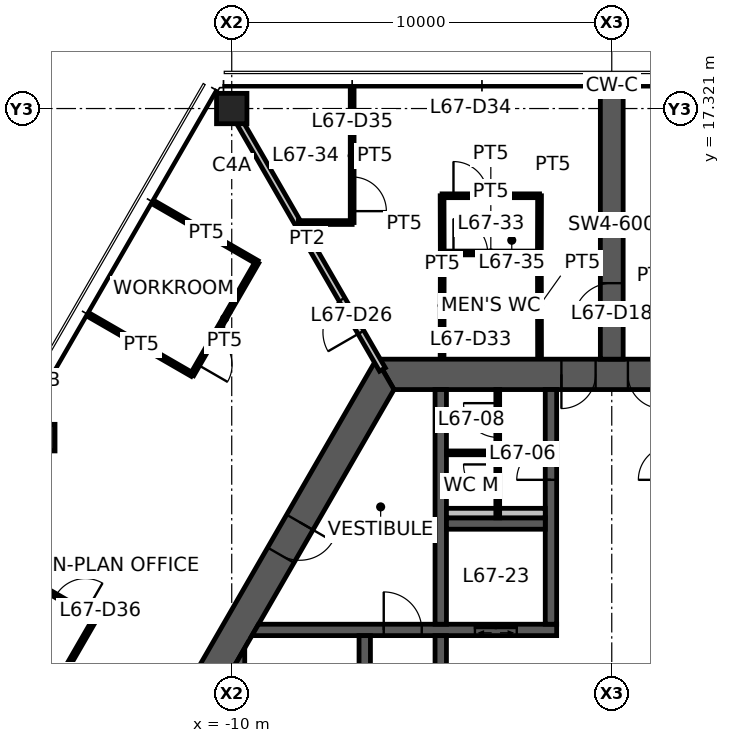
"""IFC4 building model, lengths in metres.
Left out: names, types, materials, properties, quantities, classifications, styles, units other than length and angle.
Written with IfcOpenShell. Run it as: python <this file> out.ifc"""

import sys

from ifc_helpers import new_model, si_unit, direction, frame, frame_2d, origin, origin_2d, place, context, subcontext, project, spatial, polyline, rectangle, hollow_rectangle, outline, extrude, element, fill, save


model = new_model("IFC4")
c1 = context("Model", 3, precision=1e-05, world=origin(), true_north=direction((0.0, 1.0)))
c2 = subcontext(c1, "Body", "Model", "MODEL_VIEW")
j1 = project(units=[si_unit("LENGTHUNIT", "METRE"), si_unit("PLANEANGLEUNIT", "RADIAN")], contexts=[c1])
p1 = place(None, origin())
s1 = spatial("IfcSite", under=j1, at=p1, CompositionType="ELEMENT")
p2 = place(p1, origin())
s2 = spatial("IfcBuilding", under=s1, at=p2, CompositionType="ELEMENT")
p3 = place(p2, frame((0.0, 0.0, 267.4)))
s3 = spatial("IfcBuildingStorey", under=s2, at=p3, CompositionType="ELEMENT", Elevation=267.4)
p4 = place(p3, frame((-10.0, 17.321, 0.0), z_axis=(0.0, 0.0, 1.0), x_axis=(1.0, 0.0, 0.0)))
e1 = element("IfcColumn", 1, at=p4, inside=s3, PredefinedType="COLUMN", context=c2, shape_type="SweptSolid", body=[
    extrude(hollow_rectangle(XDim=0.8, YDim=0.8, WallThickness=0.04, at=origin_2d()), origin(), (0.0, 0.0, 1.0), 3.9),
])
p5 = place(p3, frame((-15.0, 8.66, 0.0), z_axis=(0.0, 0.0, 1.0), x_axis=(1.0, 0.0, 0.0)))
e2 = element("IfcColumn", 2, at=p5, inside=s3, PredefinedType="COLUMN", context=c2, shape_type="SweptSolid", body=[
    extrude(hollow_rectangle(XDim=0.7, YDim=0.7, WallThickness=0.032, at=origin_2d()), origin(), (0.0, 0.0, 1.0), 3.9),
])
p6 = place(p3, frame((5.961, 10.325, 0.0), z_axis=(0.0, 0.0, 1.0), x_axis=(-1.0, 0.0, 0.0)))
e3 = element("IfcWall", 3, at=p6, inside=s3, PredefinedType="SHEAR", context=c2, shape_type="SweptSolid", body=[
    extrude(outline(polyline([(-0.231, -0.4), (4.636, -0.4), (5.536, -0.4), (6.386, -0.4), (7.286, -0.4), (12.153, -0.4), (11.691, 0.4), (7.286, 0.4), (6.386, 0.4), (5.536, 0.4), (4.636, 0.4), (0.231, 0.4), (-0.231, -0.4)])), origin(), (0.0, 0.0, 1.0), 3.9),
])
p7 = place(p6, frame((6.386, 0.0, 0.0)))
e4 = element("IfcOpeningElement", 4, at=p7, cuts=e3, PredefinedType="OPENING", context=c2, shape_type="SweptSolid", body=[
    extrude(rectangle(XDim=0.9, YDim=2.1, at=frame_2d((0.45, 1.05))), frame((0.0, 0.41, 0.0), z_axis=(0.0, -1.0, 0.0), x_axis=(1.0, 0.0, 0.0)), (0.0, 0.0, 1.0), 0.82),
])
p8 = place(p6, frame((4.636, 0.0, 0.0)))
e5 = element("IfcOpeningElement", 5, at=p8, cuts=e3, PredefinedType="OPENING", context=c2, shape_type="SweptSolid", body=[
    extrude(rectangle(XDim=0.9, YDim=2.1, at=frame_2d((0.45, 1.05))), frame((0.0, 0.41, 0.0), z_axis=(0.0, -1.0, 0.0), x_axis=(1.0, 0.0, 0.0)), (0.0, 0.0, 1.0), 0.82),
])
p9 = place(p3, frame((-5.961, 10.325, 0.0), z_axis=(0.0, 0.0, 1.0), x_axis=(-0.500004296715, -0.866022923061, 0.0)))
e6 = element("IfcWall", 6, at=p9, inside=s3, PredefinedType="SHEAR", context=c2, shape_type="SweptSolid", body=[
    extrude(outline(polyline([(-0.231, -0.4), (4.494, -0.4), (5.494, -0.4), (12.153, -0.4), (11.691, 0.4), (5.494, 0.4), (4.494, 0.4), (0.231, 0.4), (-0.231, -0.4)])), origin(), (0.0, 0.0, 1.0), 3.9),
])
p10 = place(p9, frame((4.494, 0.0, 0.0)))
e7 = element("IfcOpeningElement", 7, at=p10, cuts=e6, PredefinedType="OPENING", context=c2, shape_type="SweptSolid", body=[
    extrude(rectangle(XDim=1.0, YDim=2.1, at=frame_2d((0.5, 1.05))), frame((0.0, 0.41, 0.0), z_axis=(0.0, -1.0, 0.0), x_axis=(1.0, 0.0, 0.0)), (0.0, 0.0, 1.0), 0.82),
])
p11 = place(p3, frame((0.0, 10.725, 0.0), z_axis=(0.0, 0.0, 1.0), x_axis=(0.0, 1.0, 0.0)))
e8 = element("IfcWall", 8, at=p11, inside=s3, PredefinedType="SHEAR", context=c2, shape_type="SweptSolid", body=[
    extrude(rectangle(XDim=7.045, YDim=0.6, at=frame_2d((3.523, 0.0))), origin(), (0.0, 0.0, 1.0), 3.9),
])
p12 = place(p11, frame((1.0, 0.0, 0.0)))
e9 = element("IfcOpeningElement", 9, at=p12, cuts=e8, PredefinedType="OPENING", context=c2, shape_type="SweptSolid", body=[
    extrude(rectangle(XDim=1.0, YDim=2.1, at=frame_2d((0.5, 1.05))), frame((0.0, 0.31, 0.0), z_axis=(0.0, -1.0, 0.0), x_axis=(1.0, 0.0, 0.0)), (0.0, 0.0, 1.0), 0.62),
])
p13 = place(p3, frame((-9.382, 3.6, 0.0), z_axis=(0.0, 0.0, 1.0), x_axis=(1.0, 0.0, 0.0)))
e10 = element("IfcWall", 10, at=p13, inside=s3, PredefinedType="SHEAR", context=c2, shape_type="SweptSolid", body=[
    extrude(outline(polyline([(-0.087, -0.15), (3.382, -0.15), (4.382, -0.15), (5.782, -0.15), (6.882, -0.15), (7.932, -0.15), (7.932, 0.15), (6.882, 0.15), (5.782, 0.15), (4.382, 0.15), (3.382, 0.15), (0.087, 0.15), (-0.087, -0.15)])), origin(), (0.0, 0.0, 1.0), 3.9),
])
p14 = place(p13, frame((3.382, 0.0, 0.0)))
e11 = element("IfcOpeningElement", 11, at=p14, cuts=e10, PredefinedType="OPENING", context=c2, shape_type="SweptSolid", body=[
    extrude(rectangle(XDim=1.0, YDim=2.1, at=frame_2d((0.5, 1.05))), frame((0.0, 0.16, 0.0), z_axis=(0.0, -1.0, 0.0), x_axis=(1.0, 0.0, 0.0)), (0.0, 0.0, 1.0), 0.32),
])
p15 = place(p13, frame((5.782, 0.0, 0.0)))
e12 = element("IfcOpeningElement", 12, at=p15, cuts=e10, PredefinedType="OPENING", context=c2, shape_type="SweptSolid", body=[
    extrude(rectangle(XDim=1.1, YDim=2.1, at=frame_2d((0.55, 1.05))), frame((0.0, 0.16, 0.0), z_axis=(0.0, -1.0, 0.0), x_axis=(1.0, 0.0, 0.0)), (0.0, 0.0, 1.0), 0.32),
])
p16 = place(p3, frame((-1.6, 3.75, 0.0), z_axis=(0.0, 0.0, 1.0), x_axis=(0.0, 1.0, 0.0)))
e13 = element("IfcWall", 13, at=p16, inside=s3, PredefinedType="SHEAR", context=c2, shape_type="SweptSolid", body=[
    extrude(rectangle(XDim=6.175, YDim=0.3, at=frame_2d((3.087, 0.0))), origin(), (0.0, 0.0, 1.0), 3.9),
])
p17 = place(p16, frame((3.8, 0.0, 0.0)))
e14 = element("IfcOpeningElement", 14, at=p17, cuts=e13, PredefinedType="OPENING", context=c2, shape_type="SweptSolid", body=[
    extrude(rectangle(XDim=0.9, YDim=2.1, at=frame_2d((0.45, 1.05))), frame((0.0, 0.16, 0.0), z_axis=(0.0, -1.0, 0.0), x_axis=(1.0, 0.0, 0.0)), (0.0, 0.0, 1.0), 0.32),
])
p18 = place(p3, frame((-4.5, -3.45, 0.0), z_axis=(0.0, 0.0, 1.0), x_axis=(0.0, 1.0, 0.0)))
e15 = element("IfcWall", 15, at=p18, inside=s3, PredefinedType="SHEAR", context=c2, shape_type="SweptSolid", body=[
    extrude(rectangle(XDim=6.9, YDim=0.3, at=frame_2d((3.45, 0.0))), origin(), (0.0, 0.0, 1.0), 3.9),
])
p19 = place(p18, frame((2.95, 0.0, 0.0)))
e16 = element("IfcOpeningElement", 16, at=p19, cuts=e15, PredefinedType="OPENING", context=c2, shape_type="SweptSolid", body=[
    extrude(rectangle(XDim=1.0, YDim=2.1, at=frame_2d((0.5, 1.05))), frame((0.0, 0.16, 0.0), z_axis=(0.0, -1.0, 0.0), x_axis=(1.0, 0.0, 0.0)), (0.0, 0.0, 1.0), 0.32),
])
p20 = place(p3, frame((-6.5, -3.45, 0.0), z_axis=(0.0, 0.0, 1.0), x_axis=(0.0, 1.0, 0.0)))
e17 = element("IfcWall", 17, at=p20, inside=s3, PredefinedType="SHEAR", context=c2, shape_type="SweptSolid", body=[
    extrude(rectangle(XDim=6.9, YDim=0.3, at=frame_2d((3.45, 0.0))), origin(), (0.0, 0.0, 1.0), 3.9),
])
p21 = place(p20, frame((0.1, 0.0, 0.0)))
e18 = element("IfcOpeningElement", 18, at=p21, cuts=e17, PredefinedType="OPENING", context=c2, shape_type="SweptSolid", body=[
    extrude(rectangle(XDim=1.0, YDim=2.1, at=frame_2d((0.5, 1.05))), frame((0.0, 0.16, 0.0), z_axis=(0.0, -1.0, 0.0), x_axis=(1.0, 0.0, 0.0)), (0.0, 0.0, 1.0), 0.32),
])
p22 = place(p3, frame((-4.5, 3.75, 0.0), z_axis=(0.0, 0.0, 1.0), x_axis=(0.0, 1.0, 0.0)))
e19 = element("IfcWall", 19, at=p22, inside=s3, PredefinedType="SHEAR", context=c2, shape_type="SweptSolid", body=[
    extrude(rectangle(XDim=6.175, YDim=0.3, at=frame_2d((3.087, 0.0))), origin(), (0.0, 0.0, 1.0), 3.9),
])
p23 = place(p3, frame((-4.35, 6.4, 0.0), z_axis=(0.0, 0.0, 1.0), x_axis=(1.0, 0.0, 0.0)))
e20 = element("IfcWall", 20, at=p23, inside=s3, PredefinedType="SHEAR", context=c2, shape_type="SweptSolid", body=[
    extrude(rectangle(XDim=2.6, YDim=0.3, at=frame_2d((1.3, 0.0))), origin(), (0.0, 0.0, 1.0), 3.9),
])
p24 = place(p3, frame((-9.808, -2.862, 0.0), z_axis=(0.0, 0.0, 1.0), x_axis=(0.0, 1.0, 0.0)))
e21 = element("IfcWall", 21, at=p24, inside=s3, PredefinedType="SHEAR", context=c2, shape_type="SweptSolid", body=[
    extrude(outline(polyline([(-0.26, -0.15), (5.984, -0.15), (5.465, 0.15), (0.26, 0.15), (-0.26, -0.15)])), origin(), (0.0, 0.0, 1.0), 3.9),
])
p25 = place(p3, frame((-4.35, 6.675, 0.0), z_axis=(0.0, 0.0, 1.0), x_axis=(1.0, 0.0, 0.0)))
e22 = element("IfcWall", 22, at=p25, inside=s3, PredefinedType="PLUMBINGWALL", context=c2, shape_type="SweptSolid", body=[
    extrude(rectangle(XDim=2.6, YDim=0.25, at=frame_2d((1.3, 0.0))), origin(), (0.0, 0.0, 1.0), 3.9),
])
p26 = place(p3, frame((-3.0, 6.55, 0.0), z_axis=(0.0, 0.0, 1.0), x_axis=(0.0, 1.0, 0.0)))
e23 = element("IfcWall", 23, at=p26, inside=s3, PredefinedType="PARTITIONING", context=c2, shape_type="SweptSolid", body=[
    extrude(rectangle(XDim=3.375, YDim=0.1, at=frame_2d((1.688, 0.0))), origin(), (0.0, 0.0, 1.0), 2.95),
])
p27 = place(p26, frame((0.505, 0.0, 0.0)))
e24 = element("IfcOpeningElement", 24, at=p27, cuts=e23, PredefinedType="OPENING", context=c2, shape_type="SweptSolid", body=[
    extrude(rectangle(XDim=0.9, YDim=2.1, at=frame_2d((0.45, 1.05))), frame((0.0, 0.06, 0.0), z_axis=(0.0, -1.0, 0.0), x_axis=(1.0, 0.0, 0.0)), (0.0, 0.0, 1.0), 0.12),
])
p28 = place(p26, frame((2.117, 0.0, 0.0)))
e25 = element("IfcOpeningElement", 25, at=p28, cuts=e23, PredefinedType="OPENING", context=c2, shape_type="SweptSolid", body=[
    extrude(rectangle(XDim=0.9, YDim=2.1, at=frame_2d((0.45, 1.05))), frame((0.0, 0.06, 0.0), z_axis=(0.0, -1.0, 0.0), x_axis=(1.0, 0.0, 0.0)), (0.0, 0.0, 1.0), 0.12),
])
p29 = place(p3, frame((-3.05, 8.26, 0.0), z_axis=(0.0, 0.0, 1.0), x_axis=(-1.0, 0.0, 0.0)))
e26 = element("IfcWall", 26, at=p29, inside=s3, PredefinedType="PARTITIONING", context=c2, shape_type="SweptSolid", body=[
    extrude(rectangle(XDim=1.3, YDim=0.1, at=frame_2d((0.65, 0.0))), origin(), (0.0, 0.0, 1.0), 2.95),
])
p30 = place(p3, frame((-6.035, 10.453, 0.0), z_axis=(0.0, 0.0, 1.0), x_axis=(-0.499989830942, 0.866031274813, 0.0)))
e27 = element("IfcWall", 27, at=p30, inside=s3, PredefinedType="PARTITIONING", context=c2, shape_type="SweptSolid", body=[
    extrude(rectangle(XDim=7.93, YDim=0.175, at=frame_2d((3.965, 0.0))), origin(), (0.0, 0.0, 1.0), 3.05),
])
p31 = place(p30, frame((1.13, 0.0, 0.0)))
e28 = element("IfcOpeningElement", 28, at=p31, cuts=e27, PredefinedType="OPENING", context=c2, shape_type="SweptSolid", body=[
    extrude(rectangle(XDim=1.0, YDim=2.1, at=frame_2d((0.5, 1.05))), frame((0.0, 0.098, 0.0), z_axis=(0.0, -1.0, 0.0), x_axis=(1.0, 0.0, 0.0)), (0.0, 0.0, 1.0), 0.195),
])
p32 = place(p3, frame((-4.465, 13.52, 0.0), z_axis=(0.0, 0.0, 1.0), x_axis=(1.0, 0.0, 0.0)))
e29 = element("IfcWall", 29, at=p32, inside=s3, PredefinedType="PARTITIONING", context=c2, shape_type="SweptSolid", body=[
    extrude(rectangle(XDim=2.565, YDim=0.1, at=frame_2d((1.283, 0.0))), origin(), (0.0, 0.0, 1.0), 2.95),
])
p33 = place(p32, frame((0.3, 0.0, 0.0)))
e30 = element("IfcOpeningElement", 30, at=p33, cuts=e29, PredefinedType="OPENING", context=c2, shape_type="SweptSolid", body=[
    extrude(rectangle(XDim=0.9, YDim=2.1, at=frame_2d((0.45, 1.05))), frame((0.0, 0.06, 0.0), z_axis=(0.0, -1.0, 0.0), x_axis=(1.0, 0.0, 0.0)), (0.0, 0.0, 1.0), 0.12),
])
for number, where, z_axis, x_axis in (
    (31, (-4.465, 10.745, 0.0), (0.0, 0.0, 1.0), (0.002, 1.0, 0.0)),
    (32, (-1.905, 13.525, 0.0), (0.0, 0.0, 1.0), (0.002, -1.0, 0.0)),
):
    element("IfcWall", number, at=place(p3, frame(where, z_axis=z_axis, x_axis=x_axis)), inside=s3, PredefinedType="PARTITIONING", context=c2, shape_type="SweptSolid", body=[
        extrude(rectangle(XDim=2.78, YDim=0.1, at=frame_2d((1.39, 0.0))), origin(), (0.0, 0.0, 1.0), 2.95),
    ])
p34 = place(p3, frame((-4.465, 15.025, 0.0), z_axis=(0.0, 0.0, 1.0), x_axis=(1.0, 0.0, 0.0)))
e33 = element("IfcWall", 33, at=p34, inside=s3, PredefinedType="PARTITIONING", context=c2, shape_type="SweptSolid", body=[
    extrude(rectangle(XDim=2.565, YDim=0.1, at=frame_2d((1.283, 0.0))), origin(), (0.0, 0.0, 1.0), 2.95),
])
p35 = place(p34, frame((0.3, 0.0, 0.0)))
e34 = element("IfcOpeningElement", 34, at=p35, cuts=e33, PredefinedType="OPENING", context=c2, shape_type="SweptSolid", body=[
    extrude(rectangle(XDim=0.9, YDim=2.1, at=frame_2d((0.45, 1.05))), frame((0.0, 0.06, 0.0), z_axis=(0.0, -1.0, 0.0), x_axis=(1.0, 0.0, 0.0)), (0.0, 0.0, 1.0), 0.12),
])
for number, where, z_axis, x_axis in (
    (35, (-4.46, 13.525, 0.0), (0.0, 0.0, 1.0), (-0.003, 1.0, 0.0)),
    (36, (-1.9, 15.025, 0.0), (0.0, 0.0, 1.0), (-0.003, -1.0, 0.0)),
):
    element("IfcWall", number, at=place(p3, frame(where, z_axis=z_axis, x_axis=x_axis)), inside=s3, PredefinedType="PARTITIONING", context=c2, shape_type="SweptSolid", body=[
        extrude(rectangle(XDim=1.5, YDim=0.1, at=frame_2d((0.75, 0.0))), origin(), (0.0, 0.0, 1.0), 2.95),
    ])
p36 = place(p3, frame((-6.831, 14.321, 0.0), z_axis=(0.0, 0.0, 1.0), x_axis=(-1.0, 0.0, 0.0)))
e37 = element("IfcWall", 37, at=p36, inside=s3, PredefinedType="PARTITIONING", context=c2, shape_type="SweptSolid", body=[
    extrude(rectangle(XDim=1.414, YDim=0.1, at=frame_2d((0.707, 0.0))), origin(), (0.0, 0.0, 1.0), 2.95),
])
p37 = place(p3, frame((-6.831, 17.835, 0.0), z_axis=(0.0, 0.0, 1.0), x_axis=(0.0, -1.0, 0.0)))
e38 = element("IfcWall", 38, at=p37, inside=s3, PredefinedType="PARTITIONING", context=c2, shape_type="SweptSolid", body=[
    extrude(rectangle(XDim=3.515, YDim=0.1, at=frame_2d((1.757, 0.0))), origin(), (0.0, 0.0, 1.0), 2.95),
])
p38 = place(p37, frame((2.315, 0.0, 0.0)))
e39 = element("IfcOpeningElement", 39, at=p38, cuts=e38, PredefinedType="OPENING", context=c2, shape_type="SweptSolid", body=[
    extrude(rectangle(XDim=0.9, YDim=2.1, at=frame_2d((0.45, 1.05))), frame((0.0, 0.06, 0.0), z_axis=(0.0, -1.0, 0.0), x_axis=(1.0, 0.0, 0.0)), (0.0, 0.0, 1.0), 0.12),
])
p39 = place(p3, frame((-17.154, 5.96, 0.0), z_axis=(0.0, 0.0, 1.0), x_axis=(0.866014662111, -0.500018604663, 0.0)))
e40 = element("IfcWall", 40, at=p39, inside=s3, PredefinedType="PARTITIONING", context=c2, shape_type="SweptSolid", body=[
    extrude(rectangle(XDim=4.115, YDim=0.1, at=frame_2d((2.058, 0.0))), origin(), (0.0, 0.0, 1.0), 2.95),
])
p40 = place(p39, frame((2.915, 0.0, 0.0)))
e41 = element("IfcOpeningElement", 41, at=p40, cuts=e40, PredefinedType="OPENING", context=c2, shape_type="SweptSolid", body=[
    extrude(rectangle(XDim=0.9, YDim=2.1, at=frame_2d((0.45, 1.05))), frame((0.0, 0.06, 0.0), z_axis=(0.0, -1.0, 0.0), x_axis=(1.0, 0.0, 0.0)), (0.0, 0.0, 1.0), 0.12),
])
p41 = place(p3, frame((-13.59, 3.902, 0.0), z_axis=(0.0, 0.0, 1.0), x_axis=(-0.500021524473, -0.866012976267, 0.0)))
e42 = element("IfcWall", 42, at=p41, inside=s3, PredefinedType="PARTITIONING", context=c2, shape_type="SweptSolid", body=[
    extrude(rectangle(XDim=3.415, YDim=0.1, at=frame_2d((1.708, 0.0))), origin(), (0.0, 0.0, 1.0), 2.95),
])
p42 = place(p3, frame((-12.0, 14.816, 0.0), z_axis=(0.0, 0.0, 1.0), x_axis=(0.866010015463, -0.500026652407, 0.0)))
e43 = element("IfcWall", 43, at=p42, inside=s3, PredefinedType="PARTITIONING", context=c2, shape_type="SweptSolid", body=[
    extrude(rectangle(XDim=3.08, YDim=0.1, at=frame_2d((1.54, 0.0))), origin(), (0.0, 0.0, 1.0), 2.95),
])
p43 = place(p3, frame((-11.041, 10.318, 0.0), z_axis=(0.0, 0.0, 1.0), x_axis=(-0.866056658381, 0.499945861543, 0.0)))
e44 = element("IfcWall", 44, at=p43, inside=s3, PredefinedType="PARTITIONING", context=c2, shape_type="SweptSolid", body=[
    extrude(rectangle(XDim=3.09, YDim=0.1, at=frame_2d((1.545, 0.0))), origin(), (0.0, 0.0, 1.0), 2.95),
])
p44 = place(p3, frame((-9.333, 13.276, 0.0), z_axis=(0.0, 0.0, 1.0), x_axis=(-0.499967911108, -0.866043929522, 0.0)))
e45 = element("IfcWall", 45, at=p44, inside=s3, PredefinedType="PARTITIONING", context=c2, shape_type="SweptSolid", body=[
    extrude(rectangle(XDim=3.415, YDim=0.1, at=frame_2d((1.708, 0.0))), origin(), (0.0, 0.0, 1.0), 2.95),
])
p45 = place(p44, frame((2.216, 0.0, 0.0)))
e46 = element("IfcOpeningElement", 46, at=p45, cuts=e45, PredefinedType="OPENING", context=c2, shape_type="SweptSolid", body=[
    extrude(rectangle(XDim=0.9, YDim=2.1, at=frame_2d((0.45, 1.05))), frame((0.0, 0.06, 0.0), z_axis=(0.0, -1.0, 0.0), x_axis=(1.0, 0.0, 0.0)), (0.0, 0.0, 1.0), 0.12),
])
p46 = place(p3, frame((0.0, 17.771, 0.0), z_axis=(0.0, 0.0, 1.0), x_axis=(0.0, 1.0, 0.0)))
e47 = element("IfcWall", 47, at=p46, inside=s3, PredefinedType="PARTITIONING", context=c2, shape_type="SweptSolid", body=[
    extrude(rectangle(XDim=0.065, YDim=0.175, at=frame_2d((0.032, 0.0))), origin(), (0.0, 0.0, 1.0), 3.9),
])
p47 = place(p7, origin())
e48 = element("IfcDoor", 48, at=p47, inside=s3, OperationType="SINGLE_SWING_RIGHT", PredefinedType="DOOR", context=c2, shape_type="SweptSolid", body=[
    extrude(rectangle(XDim=0.9, YDim=2.1, at=frame_2d((0.45, 1.05))), frame((0.0, 0.025, 0.0), z_axis=(0.0, -1.0, 0.0), x_axis=(1.0, 0.0, 0.0)), (0.0, 0.0, 1.0), 0.05),
])
fill(e4, e48)
p48 = place(p8, origin())
e49 = element("IfcDoor", 49, at=p48, inside=s3, OperationType="SINGLE_SWING_LEFT", PredefinedType="DOOR", context=c2, shape_type="SweptSolid", body=[
    extrude(rectangle(XDim=0.9, YDim=2.1, at=frame_2d((0.45, 1.05))), frame((0.0, 0.025, 0.0), z_axis=(0.0, -1.0, 0.0), x_axis=(1.0, 0.0, 0.0)), (0.0, 0.0, 1.0), 0.05),
])
fill(e5, e49)
p49 = place(p10, origin())
e50 = element("IfcDoor", 50, at=p49, inside=s3, OperationType="SINGLE_SWING_LEFT", PredefinedType="DOOR", context=c2, shape_type="SweptSolid", body=[
    extrude(rectangle(XDim=1.0, YDim=2.1, at=frame_2d((0.5, 1.05))), frame((0.0, 0.025, 0.0), z_axis=(0.0, -1.0, 0.0), x_axis=(1.0, 0.0, 0.0)), (0.0, 0.0, 1.0), 0.05),
])
fill(e7, e50)
p50 = place(p14, origin())
e51 = element("IfcDoor", 51, at=p50, inside=s3, OperationType="SINGLE_SWING_LEFT", PredefinedType="DOOR", context=c2, shape_type="SweptSolid", body=[
    extrude(rectangle(XDim=1.0, YDim=2.1, at=frame_2d((0.5, 1.05))), frame((0.0, 0.025, 0.0), z_axis=(0.0, -1.0, 0.0), x_axis=(1.0, 0.0, 0.0)), (0.0, 0.0, 1.0), 0.05),
])
fill(e11, e51)
p51 = place(p17, origin())
e52 = element("IfcDoor", 52, at=p51, inside=s3, OperationType="SINGLE_SWING_LEFT", PredefinedType="DOOR", context=c2, shape_type="SweptSolid", body=[
    extrude(rectangle(XDim=0.9, YDim=2.1, at=frame_2d((0.45, 1.05))), frame((0.0, 0.025, 0.0), z_axis=(0.0, -1.0, 0.0), x_axis=(1.0, 0.0, 0.0)), (0.0, 0.0, 1.0), 0.05),
])
fill(e14, e52)
p52 = place(p12, origin())
e53 = element("IfcDoor", 53, at=p52, inside=s3, OperationType="SINGLE_SWING_LEFT", PredefinedType="DOOR", context=c2, shape_type="SweptSolid", body=[
    extrude(rectangle(XDim=1.0, YDim=2.1, at=frame_2d((0.5, 1.05))), frame((0.0, 0.025, 0.0), z_axis=(0.0, -1.0, 0.0), x_axis=(1.0, 0.0, 0.0)), (0.0, 0.0, 1.0), 0.05),
])
fill(e9, e53)
p53 = place(p27, origin())
e54 = element("IfcDoor", 54, at=p53, inside=s3, OperationType="SINGLE_SWING_RIGHT", PredefinedType="DOOR", context=c2, shape_type="SweptSolid", body=[
    extrude(rectangle(XDim=0.9, YDim=2.1, at=frame_2d((0.45, 1.05))), frame((0.0, 0.025, 0.0), z_axis=(0.0, -1.0, 0.0), x_axis=(1.0, 0.0, 0.0)), (0.0, 0.0, 1.0), 0.05),
])
fill(e24, e54)
p54 = place(p28, origin())
e55 = element("IfcDoor", 55, at=p54, inside=s3, OperationType="SINGLE_SWING_RIGHT", PredefinedType="DOOR", context=c2, shape_type="SweptSolid", body=[
    extrude(rectangle(XDim=0.9, YDim=2.1, at=frame_2d((0.45, 1.05))), frame((0.0, 0.025, 0.0), z_axis=(0.0, -1.0, 0.0), x_axis=(1.0, 0.0, 0.0)), (0.0, 0.0, 1.0), 0.05),
])
fill(e25, e55)
p55 = place(p31, origin())
e56 = element("IfcDoor", 56, at=p55, inside=s3, OperationType="SINGLE_SWING_LEFT", PredefinedType="DOOR", context=c2, shape_type="SweptSolid", body=[
    extrude(rectangle(XDim=1.0, YDim=2.1, at=frame_2d((0.5, 1.05))), frame((0.0, 0.025, 0.0), z_axis=(0.0, -1.0, 0.0), x_axis=(1.0, 0.0, 0.0)), (0.0, 0.0, 1.0), 0.05),
])
fill(e28, e56)
p56 = place(p33, origin())
e57 = element("IfcDoor", 57, at=p56, inside=s3, OperationType="SINGLE_SWING_LEFT", PredefinedType="DOOR", context=c2, shape_type="SweptSolid", body=[
    extrude(rectangle(XDim=0.9, YDim=2.1, at=frame_2d((0.45, 1.05))), frame((0.0, 0.025, 0.0), z_axis=(0.0, -1.0, 0.0), x_axis=(1.0, 0.0, 0.0)), (0.0, 0.0, 1.0), 0.05),
])
fill(e30, e57)
p57 = place(p35, origin())
e58 = element("IfcDoor", 58, at=p57, inside=s3, OperationType="SINGLE_SWING_LEFT", PredefinedType="DOOR", context=c2, shape_type="SweptSolid", body=[
    extrude(rectangle(XDim=0.9, YDim=2.1, at=frame_2d((0.45, 1.05))), frame((0.0, 0.025, 0.0), z_axis=(0.0, -1.0, 0.0), x_axis=(1.0, 0.0, 0.0)), (0.0, 0.0, 1.0), 0.05),
])
fill(e34, e58)
p58 = place(p38, origin())
e59 = element("IfcDoor", 59, at=p58, inside=s3, OperationType="SINGLE_SWING_RIGHT", PredefinedType="DOOR", context=c2, shape_type="SweptSolid", body=[
    extrude(rectangle(XDim=0.9, YDim=2.1, at=frame_2d((0.45, 1.05))), frame((0.0, 0.025, 0.0), z_axis=(0.0, -1.0, 0.0), x_axis=(1.0, 0.0, 0.0)), (0.0, 0.0, 1.0), 0.05),
])
fill(e39, e59)
p59 = place(p40, origin())
e60 = element("IfcDoor", 60, at=p59, inside=s3, OperationType="SINGLE_SWING_RIGHT", PredefinedType="DOOR", context=c2, shape_type="SweptSolid", body=[
    extrude(rectangle(XDim=0.9, YDim=2.1, at=frame_2d((0.45, 1.05))), frame((0.0, 0.025, 0.0), z_axis=(0.0, -1.0, 0.0), x_axis=(1.0, 0.0, 0.0)), (0.0, 0.0, 1.0), 0.05),
])
fill(e41, e60)
p60 = place(p45, origin())
e61 = element("IfcDoor", 61, at=p60, inside=s3, OperationType="SINGLE_SWING_RIGHT", PredefinedType="DOOR", context=c2, shape_type="SweptSolid", body=[
    extrude(rectangle(XDim=0.9, YDim=2.1, at=frame_2d((0.45, 1.05))), frame((0.0, 0.025, 0.0), z_axis=(0.0, -1.0, 0.0), x_axis=(1.0, 0.0, 0.0)), (0.0, 0.0, 1.0), 0.05),
])
fill(e46, e61)
p61 = place(p15, origin())
e62 = element("IfcDoor", 62, at=p61, inside=s3, OperationType="DOUBLE_DOOR_SLIDING", PredefinedType="DOOR", context=c2, shape_type="SweptSolid", body=[
    extrude(rectangle(XDim=1.1, YDim=2.1, at=frame_2d((0.55, 1.05))), frame((0.0, 0.025, 0.0), z_axis=(0.0, -1.0, 0.0), x_axis=(1.0, 0.0, 0.0)), (0.0, 0.0, 1.0), 0.05),
])
fill(e12, e62)
save(model, sys.argv[1])
